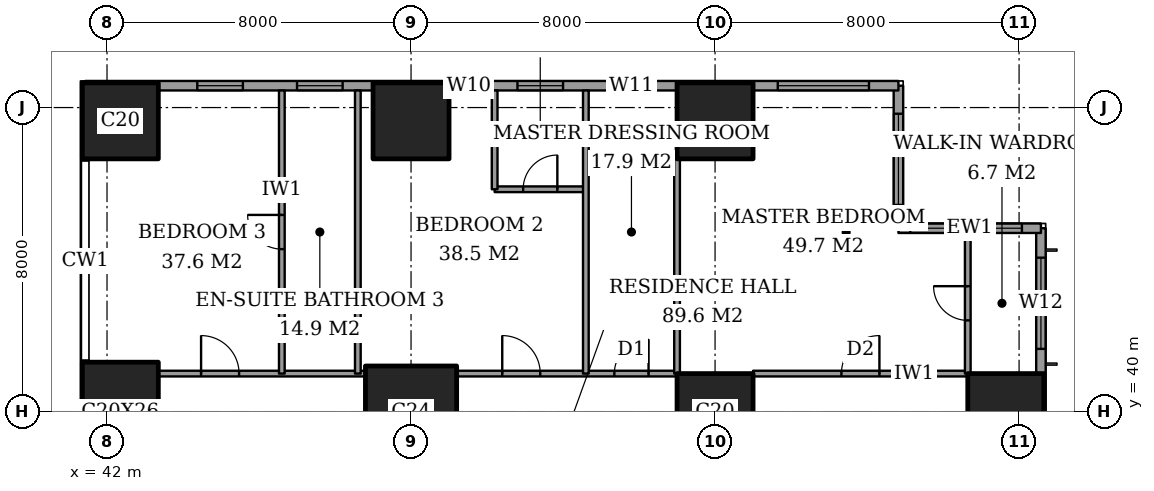
"""IFC4 building model, lengths in metres.
Left out: names, types, materials, properties, quantities, classifications, styles, units other than length and angle.
Written with IfcOpenShell. Run it as: python <this file> out.ifc"""

import sys

from ifc_helpers import new_model, si_unit, direction, frame, frame_2d, origin, origin_2d, place, context, subcontext, project, spatial, rectangle, extrude, element, fill, save


model = new_model("IFC4")
c1 = context("Model", 3, precision=1e-05, world=origin(), true_north=direction((0.0, 1.0)))
c2 = subcontext(c1, "Body", "Model", "MODEL_VIEW")
j1 = project(units=[si_unit("LENGTHUNIT", "METRE"), si_unit("PLANEANGLEUNIT", "RADIAN")], contexts=[c1])
p1 = place(None, origin())
s1 = spatial("IfcSite", under=j1, at=p1, CompositionType="ELEMENT")
p2 = place(p1, origin())
s2 = spatial("IfcBuilding", under=s1, at=p2, CompositionType="ELEMENT")
p3 = place(p2, frame((0.0, 0.0, 110.6)))
s3 = spatial("IfcBuildingStorey", under=s2, at=p3, CompositionType="ELEMENT", Elevation=110.6)
p4 = place(p3, frame((42.35, 40.0, 0.0), z_axis=(0.0, 0.0, 1.0), x_axis=(1.0, 0.0, 0.0)))
e1 = element("IfcColumn", 1, at=p4, inside=s3, PredefinedType="COLUMN", context=c2, shape_type="SweptSolid", body=[
    extrude(rectangle(XDim=2.0, YDim=2.6, at=origin_2d()), origin(), (0.0, 0.0, 1.0), 3.6),
])
p5 = place(p3, frame((42.35, 47.65, 0.0), z_axis=(0.0, 0.0, 1.0), x_axis=(1.0, 0.0, 0.0)))
e2 = element("IfcColumn", 2, at=p5, inside=s3, PredefinedType="COLUMN", context=c2, shape_type="SweptSolid", body=[
    extrude(rectangle(XDim=2.0, YDim=2.0, at=origin_2d()), origin(), (0.0, 0.0, 1.0), 3.6),
])
p6 = place(p3, frame((50.0, 40.0, 0.0), z_axis=(0.0, 0.0, 1.0), x_axis=(1.0, 0.0, 0.0)))
e3 = element("IfcColumn", 3, at=p6, inside=s3, PredefinedType="COLUMN", context=c2, shape_type="SweptSolid", body=[
    extrude(rectangle(XDim=2.4, YDim=2.4, at=origin_2d()), origin(), (0.0, 0.0, 1.0), 3.6),
])
for number, where, z_axis, x_axis in (
    (4, (50.0, 47.65, 0.0), (0.0, 0.0, 1.0), (1.0, 0.0, 0.0)),
    (5, (58.0, 40.0, 0.0), (0.0, 0.0, 1.0), (1.0, 0.0, 0.0)),
    (6, (58.0, 47.65, 0.0), (0.0, 0.0, 1.0), (1.0, 0.0, 0.0)),
    (7, (65.65, 40.0, 0.0), (0.0, 0.0, 1.0), (1.0, 0.0, 0.0)),
):
    element("IfcColumn", number, at=place(p3, frame(where, z_axis=z_axis, x_axis=x_axis)), inside=s3, PredefinedType="COLUMN", context=c2, shape_type="SweptSolid", body=[
        extrude(rectangle(XDim=2.0, YDim=2.0, at=origin_2d()), origin(), (0.0, 0.0, 1.0), 3.6),
    ])
p7 = place(p3, frame((66.575, 3.175, 0.0), z_axis=(0.0, 0.0, 1.0), x_axis=(0.0, 1.0, 0.0)))
e8 = element("IfcWall", 8, at=p7, inside=s3, PredefinedType="SOLIDWALL", context=c2, shape_type="SweptSolid", body=[
    extrude(rectangle(XDim=41.65, YDim=0.25, at=frame_2d((20.825, 0.0))), origin(), (0.0, 0.0, 1.0), 3.6),
])
p8 = place(p7, frame((0.775, 0.0, 0.4)))
e9 = element("IfcOpeningElement", 9, at=p8, cuts=e8, PredefinedType="OPENING", context=c2, shape_type="SweptSolid", body=[
    extrude(rectangle(XDim=2.4, YDim=2.2, at=frame_2d((1.2, 1.1))), frame((0.0, 0.135, 0.0), z_axis=(0.0, -1.0, 0.0), x_axis=(1.0, 0.0, 0.0)), (0.0, 0.0, 1.0), 0.27),
])
p9 = place(p7, frame((6.1, 0.0, 0.4)))
e10 = element("IfcOpeningElement", 10, at=p9, cuts=e8, PredefinedType="OPENING", context=c2, shape_type="SweptSolid", body=[
    extrude(rectangle(XDim=1.2, YDim=2.2, at=frame_2d((0.6, 1.1))), frame((0.0, 0.135, 0.0), z_axis=(0.0, -1.0, 0.0), x_axis=(1.0, 0.0, 0.0)), (0.0, 0.0, 1.0), 0.27),
])
p10 = place(p7, frame((8.275, 0.0, 0.4)))
e11 = element("IfcOpeningElement", 11, at=p10, cuts=e8, PredefinedType="OPENING", context=c2, shape_type="SweptSolid", body=[
    extrude(rectangle(XDim=2.4, YDim=2.2, at=frame_2d((1.2, 1.1))), frame((0.0, 0.135, 0.0), z_axis=(0.0, -1.0, 0.0), x_axis=(1.0, 0.0, 0.0)), (0.0, 0.0, 1.0), 0.27),
])
p11 = place(p7, frame((15.775, 0.0, 0.4)))
e12 = element("IfcOpeningElement", 12, at=p11, cuts=e8, PredefinedType="OPENING", context=c2, shape_type="SweptSolid", body=[
    extrude(rectangle(XDim=2.4, YDim=2.2, at=frame_2d((1.2, 1.1))), frame((0.0, 0.135, 0.0), z_axis=(0.0, -1.0, 0.0), x_axis=(1.0, 0.0, 0.0)), (0.0, 0.0, 1.0), 0.27),
])
p12 = place(p7, frame((23.475, 0.0, 0.4)))
e13 = element("IfcOpeningElement", 13, at=p12, cuts=e8, PredefinedType="OPENING", context=c2, shape_type="SweptSolid", body=[
    extrude(rectangle(XDim=2.4, YDim=2.2, at=frame_2d((1.2, 1.1))), frame((0.0, 0.135, 0.0), z_axis=(0.0, -1.0, 0.0), x_axis=(1.0, 0.0, 0.0)), (0.0, 0.0, 1.0), 0.27),
])
p13 = place(p7, frame((30.975, 0.0, 0.4)))
e14 = element("IfcOpeningElement", 14, at=p13, cuts=e8, PredefinedType="OPENING", context=c2, shape_type="SweptSolid", body=[
    extrude(rectangle(XDim=2.4, YDim=2.2, at=frame_2d((1.2, 1.1))), frame((0.0, 0.135, 0.0), z_axis=(0.0, -1.0, 0.0), x_axis=(1.0, 0.0, 0.0)), (0.0, 0.0, 1.0), 0.27),
])
p14 = place(p7, frame((34.5, 0.0, 0.4)))
e15 = element("IfcOpeningElement", 15, at=p14, cuts=e8, PredefinedType="OPENING", context=c2, shape_type="SweptSolid", body=[
    extrude(rectangle(XDim=1.2, YDim=2.2, at=frame_2d((0.6, 1.1))), frame((0.0, 0.135, 0.0), z_axis=(0.0, -1.0, 0.0), x_axis=(1.0, 0.0, 0.0)), (0.0, 0.0, 1.0), 0.27),
])
p15 = place(p7, frame((38.475, 0.0, 0.4)))
e16 = element("IfcOpeningElement", 16, at=p15, cuts=e8, PredefinedType="OPENING", context=c2, shape_type="SweptSolid", body=[
    extrude(rectangle(XDim=2.4, YDim=2.2, at=frame_2d((1.2, 1.1))), frame((0.0, 0.135, 0.0), z_axis=(0.0, -1.0, 0.0), x_axis=(1.0, 0.0, 0.0)), (0.0, 0.0, 1.0), 0.27),
])
p16 = place(p3, frame((66.575, 44.825, 0.0), z_axis=(0.0, 0.0, 1.0), x_axis=(-1.0, 0.0, 0.0)))
e17 = element("IfcWall", 17, at=p16, inside=s3, PredefinedType="SOLIDWALL", context=c2, shape_type="SweptSolid", body=[
    extrude(rectangle(XDim=3.75, YDim=0.25, at=frame_2d((1.875, 0.0))), origin(), (0.0, 0.0, 1.0), 3.6),
])
p17 = place(p16, frame((0.5, 0.0, 0.4)))
e18 = element("IfcOpeningElement", 18, at=p17, cuts=e17, PredefinedType="OPENING", context=c2, shape_type="SweptSolid", body=[
    extrude(rectangle(XDim=1.2, YDim=2.2, at=frame_2d((0.6, 1.1))), frame((0.0, 0.135, 0.0), z_axis=(0.0, -1.0, 0.0), x_axis=(1.0, 0.0, 0.0)), (0.0, 0.0, 1.0), 0.27),
])
p18 = place(p16, frame((2.238, 0.0, 0.4)))
e19 = element("IfcOpeningElement", 19, at=p18, cuts=e17, PredefinedType="OPENING", context=c2, shape_type="SweptSolid", body=[
    extrude(rectangle(XDim=1.2, YDim=2.2, at=frame_2d((0.6, 1.1))), frame((0.0, 0.135, 0.0), z_axis=(0.0, -1.0, 0.0), x_axis=(1.0, 0.0, 0.0)), (0.0, 0.0, 1.0), 0.27),
])
p19 = place(p3, frame((62.825, 44.825, 0.0), z_axis=(0.0, 0.0, 1.0), x_axis=(0.0, 1.0, 0.0)))
e20 = element("IfcWall", 20, at=p19, inside=s3, PredefinedType="SOLIDWALL", context=c2, shape_type="SweptSolid", body=[
    extrude(rectangle(XDim=3.75, YDim=0.25, at=frame_2d((1.875, 0.0))), origin(), (0.0, 0.0, 1.0), 3.6),
])
p20 = place(p19, frame((0.613, 0.0, 0.4)))
e21 = element("IfcOpeningElement", 21, at=p20, cuts=e20, PredefinedType="OPENING", context=c2, shape_type="SweptSolid", body=[
    extrude(rectangle(XDim=2.4, YDim=2.2, at=frame_2d((1.2, 1.1))), frame((0.0, 0.135, 0.0), z_axis=(0.0, -1.0, 0.0), x_axis=(1.0, 0.0, 0.0)), (0.0, 0.0, 1.0), 0.27),
])
p21 = place(p3, frame((62.825, 48.575, 0.0), z_axis=(0.0, 0.0, 1.0), x_axis=(-1.0, 0.0, 0.0)))
e22 = element("IfcWall", 22, at=p21, inside=s3, PredefinedType="SOLIDWALL", context=c2, shape_type="SweptSolid", body=[
    extrude(rectangle(XDim=21.4, YDim=0.25, at=frame_2d((10.7, 0.0))), origin(), (0.0, 0.0, 1.0), 3.6),
])
p22 = place(p21, frame((0.775, 0.0, 0.4)))
e23 = element("IfcOpeningElement", 23, at=p22, cuts=e22, PredefinedType="OPENING", context=c2, shape_type="SweptSolid", body=[
    extrude(rectangle(XDim=2.4, YDim=2.2, at=frame_2d((1.2, 1.1))), frame((0.0, 0.135, 0.0), z_axis=(0.0, -1.0, 0.0), x_axis=(1.0, 0.0, 0.0)), (0.0, 0.0, 1.0), 0.27),
])
p23 = place(p21, frame((6.425, 0.0, 0.4)))
e24 = element("IfcOpeningElement", 24, at=p23, cuts=e22, PredefinedType="OPENING", context=c2, shape_type="SweptSolid", body=[
    extrude(rectangle(XDim=1.2, YDim=2.2, at=frame_2d((0.6, 1.1))), frame((0.0, 0.135, 0.0), z_axis=(0.0, -1.0, 0.0), x_axis=(1.0, 0.0, 0.0)), (0.0, 0.0, 1.0), 0.27),
])
p24 = place(p21, frame((8.825, 0.0, 0.4)))
e25 = element("IfcOpeningElement", 25, at=p24, cuts=e22, PredefinedType="OPENING", context=c2, shape_type="SweptSolid", body=[
    extrude(rectangle(XDim=1.2, YDim=2.2, at=frame_2d((0.6, 1.1))), frame((0.0, 0.135, 0.0), z_axis=(0.0, -1.0, 0.0), x_axis=(1.0, 0.0, 0.0)), (0.0, 0.0, 1.0), 0.27),
])
p25 = place(p21, frame((11.0, 0.0, 0.4)))
e26 = element("IfcOpeningElement", 26, at=p25, cuts=e22, PredefinedType="OPENING", context=c2, shape_type="SweptSolid", body=[
    extrude(rectangle(XDim=0.6, YDim=2.2, at=frame_2d((0.3, 1.1))), frame((0.0, 0.135, 0.0), z_axis=(0.0, -1.0, 0.0), x_axis=(1.0, 0.0, 0.0)), (0.0, 0.0, 1.0), 0.27),
])
p26 = place(p21, frame((14.625, 0.0, 0.4)))
e27 = element("IfcOpeningElement", 27, at=p26, cuts=e22, PredefinedType="OPENING", context=c2, shape_type="SweptSolid", body=[
    extrude(rectangle(XDim=1.2, YDim=2.2, at=frame_2d((0.6, 1.1))), frame((0.0, 0.135, 0.0), z_axis=(0.0, -1.0, 0.0), x_axis=(1.0, 0.0, 0.0)), (0.0, 0.0, 1.0), 0.27),
])
p27 = place(p21, frame((17.25, 0.0, 0.4)))
e28 = element("IfcOpeningElement", 28, at=p27, cuts=e22, PredefinedType="OPENING", context=c2, shape_type="SweptSolid", body=[
    extrude(rectangle(XDim=1.2, YDim=2.2, at=frame_2d((0.6, 1.1))), frame((0.0, 0.135, 0.0), z_axis=(0.0, -1.0, 0.0), x_axis=(1.0, 0.0, 0.0)), (0.0, 0.0, 1.0), 0.27),
])
p28 = place(p3, frame((43.35, 41.0, 0.0), z_axis=(0.0, 0.0, 1.0), x_axis=(1.0, 0.0, 0.0)))
e29 = element("IfcWall", 29, at=p28, inside=s3, PredefinedType="PARTITIONING", context=c2, shape_type="SweptSolid", body=[
    extrude(rectangle(XDim=5.45, YDim=0.15, at=frame_2d((2.725, 0.0))), origin(), (0.0, 0.0, 1.0), 3.35),
])
p29 = place(p28, frame((1.125, 0.0, 0.0)))
e30 = element("IfcOpeningElement", 30, at=p29, cuts=e29, PredefinedType="OPENING", context=c2, shape_type="SweptSolid", body=[
    extrude(rectangle(XDim=1.0, YDim=2.1, at=frame_2d((0.5, 1.05))), frame((0.0, 0.085, 0.0), z_axis=(0.0, -1.0, 0.0), x_axis=(1.0, 0.0, 0.0)), (0.0, 0.0, 1.0), 0.17),
])
p30 = place(p3, frame((51.2, 41.0, 0.0), z_axis=(0.0, 0.0, 1.0), x_axis=(1.0, 0.0, 0.0)))
e31 = element("IfcWall", 31, at=p30, inside=s3, PredefinedType="PARTITIONING", context=c2, shape_type="SweptSolid", body=[
    extrude(rectangle(XDim=5.8, YDim=0.15, at=frame_2d((2.9, 0.0))), origin(), (0.0, 0.0, 1.0), 3.35),
])
p31 = place(p30, frame((4.15, 0.0, 0.0)))
e32 = element("IfcOpeningElement", 32, at=p31, cuts=e31, PredefinedType="OPENING", context=c2, shape_type="SweptSolid", body=[
    extrude(rectangle(XDim=0.9, YDim=2.1, at=frame_2d((0.45, 1.05))), frame((0.0, 0.085, 0.0), z_axis=(0.0, -1.0, 0.0), x_axis=(1.0, 0.0, 0.0)), (0.0, 0.0, 1.0), 0.17),
])
p32 = place(p30, frame((1.2, 0.0, 0.0)))
e33 = element("IfcOpeningElement", 33, at=p32, cuts=e31, PredefinedType="OPENING", context=c2, shape_type="SweptSolid", body=[
    extrude(rectangle(XDim=1.0, YDim=2.1, at=frame_2d((0.5, 1.05))), frame((0.0, 0.085, 0.0), z_axis=(0.0, -1.0, 0.0), x_axis=(1.0, 0.0, 0.0)), (0.0, 0.0, 1.0), 0.17),
])
p33 = place(p3, frame((59.0, 41.0, 0.0), z_axis=(0.0, 0.0, 1.0), x_axis=(1.0, 0.0, 0.0)))
e34 = element("IfcWall", 34, at=p33, inside=s3, PredefinedType="PARTITIONING", context=c2, shape_type="SweptSolid", body=[
    extrude(rectangle(XDim=5.65, YDim=0.15, at=frame_2d((2.825, 0.0))), origin(), (0.0, 0.0, 1.0), 3.35),
])
p34 = place(p33, frame((2.325, 0.0, 0.0)))
e35 = element("IfcOpeningElement", 35, at=p34, cuts=e34, PredefinedType="OPENING", context=c2, shape_type="SweptSolid", body=[
    extrude(rectangle(XDim=1.0, YDim=2.1, at=frame_2d((0.5, 1.05))), frame((0.0, 0.085, 0.0), z_axis=(0.0, -1.0, 0.0), x_axis=(1.0, 0.0, 0.0)), (0.0, 0.0, 1.0), 0.17),
])
p35 = place(p3, frame((52.2, 45.85, 0.0), z_axis=(0.0, 0.0, 1.0), x_axis=(1.0, 0.0, 0.0)))
e36 = element("IfcWall", 36, at=p35, inside=s3, PredefinedType="PARTITIONING", context=c2, shape_type="SweptSolid", body=[
    extrude(rectangle(XDim=2.4, YDim=0.15, at=frame_2d((1.2, 0.0))), origin(), (0.0, 0.0, 1.0), 3.35),
])
p36 = place(p35, frame((0.75, 0.0, 0.0)))
e37 = element("IfcOpeningElement", 37, at=p36, cuts=e36, PredefinedType="OPENING", context=c2, shape_type="SweptSolid", body=[
    extrude(rectangle(XDim=0.9, YDim=2.1, at=frame_2d((0.45, 1.05))), frame((0.0, 0.085, 0.0), z_axis=(0.0, -1.0, 0.0), x_axis=(1.0, 0.0, 0.0)), (0.0, 0.0, 1.0), 0.17),
])
p37 = place(p3, frame((46.6, 41.0, 0.0), z_axis=(0.0, 0.0, 1.0), x_axis=(0.0, 1.0, 0.0)))
e38 = element("IfcWall", 38, at=p37, inside=s3, PredefinedType="PARTITIONING", context=c2, shape_type="SweptSolid", body=[
    extrude(rectangle(XDim=7.45, YDim=0.15, at=frame_2d((3.725, 0.0))), origin(), (0.0, 0.0, 1.0), 3.35),
])
p38 = place(p37, frame((3.275, 0.0, 0.0)))
e39 = element("IfcOpeningElement", 39, at=p38, cuts=e38, PredefinedType="OPENING", context=c2, shape_type="SweptSolid", body=[
    extrude(rectangle(XDim=0.9, YDim=2.1, at=frame_2d((0.45, 1.05))), frame((0.0, 0.085, 0.0), z_axis=(0.0, -1.0, 0.0), x_axis=(1.0, 0.0, 0.0)), (0.0, 0.0, 1.0), 0.17),
])
p39 = place(p3, frame((48.6, 41.0, 0.0), z_axis=(0.0, 0.0, 1.0), x_axis=(0.0, 1.0, 0.0)))
e40 = element("IfcWall", 40, at=p39, inside=s3, PredefinedType="PARTITIONING", context=c2, shape_type="SweptSolid", body=[
    extrude(rectangle(XDim=7.45, YDim=0.15, at=frame_2d((3.725, 0.0))), origin(), (0.0, 0.0, 1.0), 3.35),
])
p40 = place(p3, frame((52.2, 45.85, 0.0), z_axis=(0.0, 0.0, 1.0), x_axis=(0.0, 1.0, 0.0)))
e41 = element("IfcWall", 41, at=p40, inside=s3, PredefinedType="PARTITIONING", context=c2, shape_type="SweptSolid", body=[
    extrude(rectangle(XDim=2.6, YDim=0.15, at=frame_2d((1.3, 0.0))), origin(), (0.0, 0.0, 1.0), 3.35),
])
p41 = place(p3, frame((54.6, 41.0, 0.0), z_axis=(0.0, 0.0, 1.0), x_axis=(0.0, 1.0, 0.0)))
e42 = element("IfcWall", 42, at=p41, inside=s3, PredefinedType="PARTITIONING", context=c2, shape_type="SweptSolid", body=[
    extrude(rectangle(XDim=7.45, YDim=0.15, at=frame_2d((3.725, 0.0))), origin(), (0.0, 0.0, 1.0), 3.35),
])
p42 = place(p3, frame((57.0, 41.0, 0.0), z_axis=(0.0, 0.0, 1.0), x_axis=(0.0, 1.0, 0.0)))
e43 = element("IfcWall", 43, at=p42, inside=s3, PredefinedType="PARTITIONING", context=c2, shape_type="SweptSolid", body=[
    extrude(rectangle(XDim=5.65, YDim=0.15, at=frame_2d((2.825, 0.0))), origin(), (0.0, 0.0, 1.0), 3.35),
])
p43 = place(p3, frame((64.65, 41.0, 0.0), z_axis=(0.0, 0.0, 1.0), x_axis=(0.0, 1.0, 0.0)))
e44 = element("IfcWall", 44, at=p43, inside=s3, PredefinedType="PARTITIONING", context=c2, shape_type="SweptSolid", body=[
    extrude(rectangle(XDim=3.7, YDim=0.15, at=frame_2d((1.85, 0.0))), origin(), (0.0, 0.0, 1.0), 3.35),
])
p44 = place(p43, frame((1.4, 0.0, 0.0)))
e45 = element("IfcOpeningElement", 45, at=p44, cuts=e44, PredefinedType="OPENING", context=c2, shape_type="SweptSolid", body=[
    extrude(rectangle(XDim=0.9, YDim=2.1, at=frame_2d((0.45, 1.05))), frame((0.0, 0.085, 0.0), z_axis=(0.0, -1.0, 0.0), x_axis=(1.0, 0.0, 0.0)), (0.0, 0.0, 1.0), 0.17),
])
p45 = place(p15, origin())
e46 = element("IfcWindow", 46, at=p45, inside=s3, PartitioningType="SINGLE_PANEL", PredefinedType="WINDOW", context=c2, shape_type="SweptSolid", body=[
    extrude(rectangle(XDim=2.4, YDim=2.2, at=frame_2d((1.2, 1.1))), frame((0.0, 0.03, 0.0), z_axis=(0.0, -1.0, 0.0), x_axis=(1.0, 0.0, 0.0)), (0.0, 0.0, 1.0), 0.06),
])
fill(e16, e46)
p46 = place(p17, origin())
e47 = element("IfcWindow", 47, at=p46, inside=s3, PartitioningType="SINGLE_PANEL", PredefinedType="WINDOW", context=c2, shape_type="SweptSolid", body=[
    extrude(rectangle(XDim=1.2, YDim=2.2, at=frame_2d((0.6, 1.1))), frame((0.0, 0.03, 0.0), z_axis=(0.0, -1.0, 0.0), x_axis=(1.0, 0.0, 0.0)), (0.0, 0.0, 1.0), 0.06),
])
fill(e18, e47)
p47 = place(p18, origin())
e48 = element("IfcWindow", 48, at=p47, inside=s3, PartitioningType="SINGLE_PANEL", PredefinedType="WINDOW", context=c2, shape_type="SweptSolid", body=[
    extrude(rectangle(XDim=1.2, YDim=2.2, at=frame_2d((0.6, 1.1))), frame((0.0, 0.03, 0.0), z_axis=(0.0, -1.0, 0.0), x_axis=(1.0, 0.0, 0.0)), (0.0, 0.0, 1.0), 0.06),
])
fill(e19, e48)
p48 = place(p20, origin())
e49 = element("IfcWindow", 49, at=p48, inside=s3, PartitioningType="SINGLE_PANEL", PredefinedType="WINDOW", context=c2, shape_type="SweptSolid", body=[
    extrude(rectangle(XDim=2.4, YDim=2.2, at=frame_2d((1.2, 1.1))), frame((0.0, 0.03, 0.0), z_axis=(0.0, -1.0, 0.0), x_axis=(1.0, 0.0, 0.0)), (0.0, 0.0, 1.0), 0.06),
])
fill(e21, e49)
p49 = place(p22, origin())
e50 = element("IfcWindow", 50, at=p49, inside=s3, PartitioningType="SINGLE_PANEL", PredefinedType="WINDOW", context=c2, shape_type="SweptSolid", body=[
    extrude(rectangle(XDim=2.4, YDim=2.2, at=frame_2d((1.2, 1.1))), frame((0.0, 0.03, 0.0), z_axis=(0.0, -1.0, 0.0), x_axis=(1.0, 0.0, 0.0)), (0.0, 0.0, 1.0), 0.06),
])
fill(e23, e50)
p50 = place(p23, origin())
e51 = element("IfcWindow", 51, at=p50, inside=s3, PartitioningType="SINGLE_PANEL", PredefinedType="WINDOW", context=c2, shape_type="SweptSolid", body=[
    extrude(rectangle(XDim=1.2, YDim=2.2, at=frame_2d((0.6, 1.1))), frame((0.0, 0.03, 0.0), z_axis=(0.0, -1.0, 0.0), x_axis=(1.0, 0.0, 0.0)), (0.0, 0.0, 1.0), 0.06),
])
fill(e24, e51)
p51 = place(p24, origin())
e52 = element("IfcWindow", 52, at=p51, inside=s3, PartitioningType="SINGLE_PANEL", PredefinedType="WINDOW", context=c2, shape_type="SweptSolid", body=[
    extrude(rectangle(XDim=1.2, YDim=2.2, at=frame_2d((0.6, 1.1))), frame((0.0, 0.03, 0.0), z_axis=(0.0, -1.0, 0.0), x_axis=(1.0, 0.0, 0.0)), (0.0, 0.0, 1.0), 0.06),
])
fill(e25, e52)
p52 = place(p25, origin())
e53 = element("IfcWindow", 53, at=p52, inside=s3, PartitioningType="SINGLE_PANEL", PredefinedType="WINDOW", context=c2, shape_type="SweptSolid", body=[
    extrude(rectangle(XDim=0.6, YDim=2.2, at=frame_2d((0.3, 1.1))), frame((0.0, 0.03, 0.0), z_axis=(0.0, -1.0, 0.0), x_axis=(1.0, 0.0, 0.0)), (0.0, 0.0, 1.0), 0.06),
])
fill(e26, e53)
p53 = place(p26, origin())
e54 = element("IfcWindow", 54, at=p53, inside=s3, PartitioningType="SINGLE_PANEL", PredefinedType="WINDOW", context=c2, shape_type="SweptSolid", body=[
    extrude(rectangle(XDim=1.2, YDim=2.2, at=frame_2d((0.6, 1.1))), frame((0.0, 0.03, 0.0), z_axis=(0.0, -1.0, 0.0), x_axis=(1.0, 0.0, 0.0)), (0.0, 0.0, 1.0), 0.06),
])
fill(e27, e54)
p54 = place(p27, origin())
e55 = element("IfcWindow", 55, at=p54, inside=s3, PartitioningType="SINGLE_PANEL", PredefinedType="WINDOW", context=c2, shape_type="SweptSolid", body=[
    extrude(rectangle(XDim=1.2, YDim=2.2, at=frame_2d((0.6, 1.1))), frame((0.0, 0.03, 0.0), z_axis=(0.0, -1.0, 0.0), x_axis=(1.0, 0.0, 0.0)), (0.0, 0.0, 1.0), 0.06),
])
fill(e28, e55)
p55 = place(p44, origin())
e56 = element("IfcDoor", 56, at=p55, inside=s3, OperationType="SINGLE_SWING_LEFT", PredefinedType="DOOR", context=c2, shape_type="SweptSolid", body=[
    extrude(rectangle(XDim=0.9, YDim=2.1, at=frame_2d((0.45, 1.05))), frame((0.0, 0.025, 0.0), z_axis=(0.0, -1.0, 0.0), x_axis=(1.0, 0.0, 0.0)), (0.0, 0.0, 1.0), 0.05),
])
fill(e45, e56)
p56 = place(p34, origin())
e57 = element("IfcDoor", 57, at=p56, inside=s3, OperationType="SINGLE_SWING_LEFT", PredefinedType="DOOR", context=c2, shape_type="SweptSolid", body=[
    extrude(rectangle(XDim=1.0, YDim=2.1, at=frame_2d((0.5, 1.05))), frame((0.0, 0.025, 0.0), z_axis=(0.0, -1.0, 0.0), x_axis=(1.0, 0.0, 0.0)), (0.0, 0.0, 1.0), 0.05),
])
fill(e35, e57)
p57 = place(p31, origin())
e58 = element("IfcDoor", 58, at=p57, inside=s3, OperationType="SINGLE_SWING_LEFT", PredefinedType="DOOR", context=c2, shape_type="SweptSolid", body=[
    extrude(rectangle(XDim=0.9, YDim=2.1, at=frame_2d((0.45, 1.05))), frame((0.0, 0.025, 0.0), z_axis=(0.0, -1.0, 0.0), x_axis=(1.0, 0.0, 0.0)), (0.0, 0.0, 1.0), 0.05),
])
fill(e32, e58)
p58 = place(p36, origin())
e59 = element("IfcDoor", 59, at=p58, inside=s3, OperationType="SINGLE_SWING_LEFT", PredefinedType="DOOR", context=c2, shape_type="SweptSolid", body=[
    extrude(rectangle(XDim=0.9, YDim=2.1, at=frame_2d((0.45, 1.05))), frame((0.0, 0.025, 0.0), z_axis=(0.0, -1.0, 0.0), x_axis=(1.0, 0.0, 0.0)), (0.0, 0.0, 1.0), 0.05),
])
fill(e37, e59)
p59 = place(p32, origin())
e60 = element("IfcDoor", 60, at=p59, inside=s3, OperationType="SINGLE_SWING_RIGHT", PredefinedType="DOOR", context=c2, shape_type="SweptSolid", body=[
    extrude(rectangle(XDim=1.0, YDim=2.1, at=frame_2d((0.5, 1.05))), frame((0.0, 0.025, 0.0), z_axis=(0.0, -1.0, 0.0), x_axis=(1.0, 0.0, 0.0)), (0.0, 0.0, 1.0), 0.05),
])
fill(e33, e60)
p60 = place(p38, origin())
e61 = element("IfcDoor", 61, at=p60, inside=s3, OperationType="SINGLE_SWING_LEFT", PredefinedType="DOOR", context=c2, shape_type="SweptSolid", body=[
    extrude(rectangle(XDim=0.9, YDim=2.1, at=frame_2d((0.45, 1.05))), frame((0.0, 0.025, 0.0), z_axis=(0.0, -1.0, 0.0), x_axis=(1.0, 0.0, 0.0)), (0.0, 0.0, 1.0), 0.05),
])
fill(e39, e61)
p61 = place(p29, origin())
e62 = element("IfcDoor", 62, at=p61, inside=s3, OperationType="SINGLE_SWING_RIGHT", PredefinedType="DOOR", context=c2, shape_type="SweptSolid", body=[
    extrude(rectangle(XDim=1.0, YDim=2.1, at=frame_2d((0.5, 1.05))), frame((0.0, 0.025, 0.0), z_axis=(0.0, -1.0, 0.0), x_axis=(1.0, 0.0, 0.0)), (0.0, 0.0, 1.0), 0.05),
])
fill(e30, e62)
save(model, sys.argv[1])
